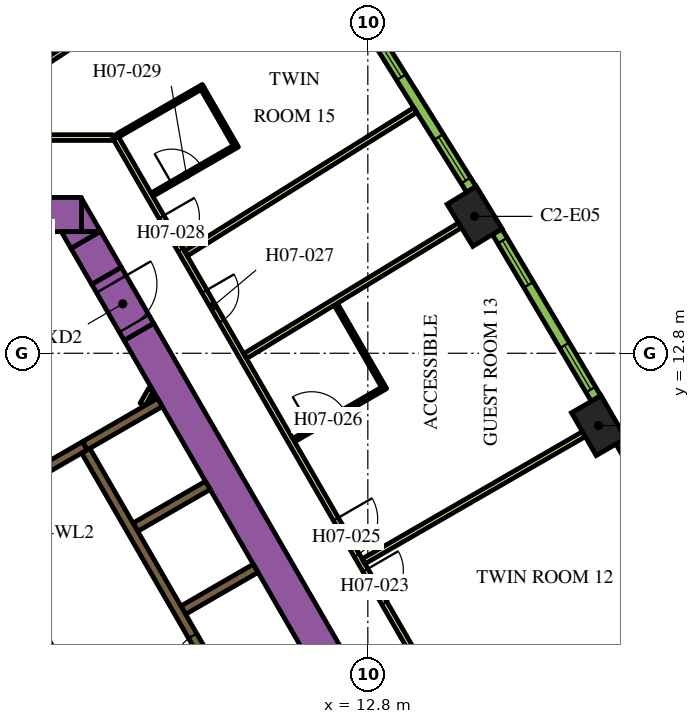
"""IFC4 building model, lengths in metres.
Left out: names, types, materials, properties, quantities, classifications, styles, units other than length and angle.
Written with IfcOpenShell. Run it as: python <this file> out.ifc"""

import sys

from ifc_helpers import new_model, si_unit, direction, frame, frame_2d, origin, origin_2d, place, context, subcontext, project, spatial, polyline, rectangle, outline, extrude, element, fill, save


model = new_model("IFC4")
c1 = context("Model", 3, precision=1e-05, world=origin(), true_north=direction((0.0, 1.0)))
c2 = subcontext(c1, "Body", "Model", "MODEL_VIEW")
j1 = project(units=[si_unit("LENGTHUNIT", "METRE"), si_unit("PLANEANGLEUNIT", "RADIAN")], contexts=[c1])
p1 = place(None, origin())
s1 = spatial("IfcSite", under=j1, at=p1, CompositionType="ELEMENT")
p2 = place(p1, origin())
s2 = spatial("IfcBuilding", under=s1, at=p2, CompositionType="ELEMENT")
p3 = place(p2, frame((0.0, 0.0, 95.4)))
s3 = spatial("IfcBuildingStorey", under=s2, at=p3, CompositionType="ELEMENT", Elevation=95.4)
for number, where, z_axis, x_axis in (
    (1, (18.874, 10.897, 0.0), (0.0, 0.0, 1.0), (-0.5, 0.866, 0.0)),
    (2, (15.609, 16.402, 0.0), (0.0, 0.0, 1.0), (-0.52, 0.854, 0.0)),
):
    element("IfcColumn", number, at=place(p3, frame(where, z_axis=z_axis, x_axis=x_axis)), inside=s3, PredefinedType="COLUMN", context=c2, shape_type="SweptSolid", body=[
        extrude(rectangle(XDim=1.3, YDim=0.9, at=origin_2d()), origin(), (0.0, 0.0, 1.0), 3.9),
    ])
p4 = place(p3, frame((6.776, 13.364, 0.0), z_axis=(0.0, 0.0, 1.0), x_axis=(0.500004177138, -0.8660229921, 0.0)))
e3 = element("IfcWall", 3, at=p4, inside=s3, PredefinedType="SOLIDWALL", context=c2, shape_type="SweptSolid", body=[
    extrude(rectangle(XDim=20.204, YDim=0.9, at=frame_2d((10.102, 0.0))), origin(), (0.0, 0.0, 1.0), 3.9),
])
p5 = place(p3, frame((-4.224, 16.45, 0.0), z_axis=(0.0, 0.0, 1.0), x_axis=(1.0, 0.0, 0.0)))
e4 = element("IfcWall", 4, at=p5, inside=s3, PredefinedType="SOLIDWALL", context=c2, shape_type="SweptSolid", body=[
    extrude(rectangle(XDim=9.488, YDim=0.9, at=frame_2d((4.744, 0.0))), origin(), (0.0, 0.0, 1.0), 3.9),
])
p6 = place(p3, origin())
e5 = element("IfcWall", 5, at=p6, inside=s3, PredefinedType="SOLIDWALL", context=c2, shape_type="SweptSolid", body=[
    extrude(outline(polyline([(5.265, 16.0), (5.265, 16.88), (5.773, 16.0), (5.265, 16.0)])), origin(), (0.0, 0.0, 1.0), 3.9),
])
p7 = place(p3, frame((5.926, 14.836, 0.0), z_axis=(0.0, 0.0, 1.0), x_axis=(-0.500076735116, 0.865981096212, 0.0)))
e6 = element("IfcWall", 6, at=p7, inside=s3, PredefinedType="SOLIDWALL", context=c2, shape_type="SweptSolid", body=[
    extrude(rectangle(XDim=1.094, YDim=0.9, at=frame_2d((0.547, 0.0))), origin(), (0.0, 0.0, 1.0), 3.9),
])
e7 = element("IfcWall", 7, at=p6, inside=s3, PredefinedType="SOLIDWALL", context=c2, shape_type="SweptSolid", body=[
    extrude(outline(polyline([(4.734, 16.0), (5.75, 16.0), (4.988, 15.56), (4.734, 16.0)])), origin(), (0.0, 0.0, 1.0), 3.9),
])
e8 = element("IfcWall", 8, at=p6, inside=s3, PredefinedType="SOLIDWALL", context=c2, shape_type="SweptSolid", body=[
    extrude(outline(polyline([(0.566, 6.725), (0.566, 6.875), (0.566, 6.875), (0.565, 6.875), (0.361, 6.875), (0.035, 7.439), (0.252, 7.564), (0.377, 7.348), (6.552, -3.348), (6.677, -3.564), (6.46, -3.689), (0.448, 6.725), (0.565, 6.725), (0.566, 6.725), (0.566, 6.725)])), origin(), (0.0, 0.0, 1.0), 3.9),
])
p8 = place(p3, frame((4.358, 9.791, 0.0), z_axis=(0.0, 0.0, 1.0), x_axis=(0.866079547155, 0.499906209203, 0.0)))
e9 = element("IfcWall", 9, at=p8, inside=s3, PredefinedType="SOLIDWALL", context=c2, shape_type="SweptSolid", body=[
    extrude(rectangle(XDim=1.15, YDim=0.25, at=frame_2d((0.575, 0.0))), origin(), (0.0, 0.0, 1.0), 3.9),
])
p9 = place(p3, frame((5.356, 10.367, 0.0), z_axis=(0.0, 0.0, 1.0), x_axis=(0.865978535641, 0.50008116922, 0.0)))
e10 = element("IfcWall", 10, at=p9, inside=s3, PredefinedType="SOLIDWALL", context=c2, shape_type="SweptSolid", body=[
    extrude(rectangle(XDim=2.278, YDim=0.25, at=frame_2d((1.139, 0.0))), origin(), (0.0, 0.0, 1.0), 3.9),
])
for number, where, z_axis, x_axis in (
    (11, (6.684, 8.224, 0.0), (0.0, 0.0, 1.0), (0.866, 0.5, 0.0)),
    (12, (7.944, 6.041, 0.0), (0.0, 0.0, 1.0), (0.866, 0.5, 0.0)),
):
    element("IfcWall", number, at=place(p3, frame(where, z_axis=z_axis, x_axis=x_axis)), inside=s3, PredefinedType="SOLIDWALL", context=c2, shape_type="SweptSolid", body=[
        extrude(rectangle(XDim=2.2, YDim=0.25, at=frame_2d((1.1, 0.0))), origin(), (0.0, 0.0, 1.0), 3.9),
    ])
p10 = place(p3, frame((6.872, 11.45, 0.0), z_axis=(0.0, 0.0, 1.0), x_axis=(0.499846793097, 0.866113839764, 0.0)))
e13 = element("IfcWall", 13, at=p10, inside=s3, PredefinedType="PARTITIONING", context=c2, shape_type="SweptSolid", body=[
    extrude(rectangle(XDim=0.453, YDim=0.15, at=frame_2d((0.227, 0.0))), origin(), (0.0, 0.0, 1.0), 2.75),
])
p11 = place(p3, frame((7.131, 11.6, 0.0), z_axis=(0.0, 0.0, 1.0), x_axis=(0.498600033135, 0.866832167699, 0.0)))
e14 = element("IfcWall", 14, at=p11, inside=s3, PredefinedType="PARTITIONING", context=c2, shape_type="SweptSolid", body=[
    extrude(rectangle(XDim=0.107, YDim=0.15, at=frame_2d((0.053, 0.0))), origin(), (0.0, 0.0, 1.0), 2.75),
])
p12 = place(p3, frame((11.553, -0.46, 0.0), z_axis=(0.0, 0.0, 1.0), x_axis=(-0.500006514828, 0.866021642414, 0.0)))
e15 = element("IfcWall", 15, at=p12, inside=s3, PredefinedType="SOLIDWALL", context=c2, shape_type="SweptSolid", body=[
    extrude(rectangle(XDim=12.35, YDim=0.25, at=frame_2d((6.175, 0.0))), origin(), (0.0, 0.0, 1.0), 3.9),
])
p13 = place(p12, frame((0.585, 0.0, 0.0)))
e16 = element("IfcOpeningElement", 16, at=p13, cuts=e15, PredefinedType="OPENING", context=c2, shape_type="SweptSolid", body=[
    extrude(rectangle(XDim=1.1, YDim=2.1, at=frame_2d((0.55, 1.05))), frame((0.0, 0.135, 0.0), z_axis=(0.0, -1.0, 0.0), x_axis=(1.0, 0.0, 0.0)), (0.0, 0.0, 1.0), 0.27),
])
p14 = place(p12, frame((3.105, 0.0, 0.0)))
e17 = element("IfcOpeningElement", 17, at=p14, cuts=e15, PredefinedType="OPENING", context=c2, shape_type="SweptSolid", body=[
    extrude(rectangle(XDim=1.1, YDim=2.1, at=frame_2d((0.55, 1.05))), frame((0.0, 0.135, 0.0), z_axis=(0.0, -1.0, 0.0), x_axis=(1.0, 0.0, 0.0)), (0.0, 0.0, 1.0), 0.27),
])
p15 = place(p12, frame((5.625, 0.0, 0.0)))
e18 = element("IfcOpeningElement", 18, at=p15, cuts=e15, PredefinedType="OPENING", context=c2, shape_type="SweptSolid", body=[
    extrude(rectangle(XDim=1.1, YDim=2.1, at=frame_2d((0.55, 1.05))), frame((0.0, 0.135, 0.0), z_axis=(0.0, -1.0, 0.0), x_axis=(1.0, 0.0, 0.0)), (0.0, 0.0, 1.0), 0.27),
])
p16 = place(p3, frame((8.565, -2.185, 0.0), z_axis=(0.0, 0.0, 1.0), x_axis=(-0.499997954832, 0.866026584559, 0.0)))
e19 = element("IfcWall", 19, at=p16, inside=s3, PredefinedType="SOLIDWALL", context=c2, shape_type="SweptSolid", body=[
    extrude(rectangle(XDim=12.35, YDim=0.25, at=frame_2d((6.175, 0.0))), origin(), (0.0, 0.0, 1.0), 3.9),
])
p17 = place(p16, frame((5.725, 0.0, 0.0)))
e20 = element("IfcOpeningElement", 20, at=p17, cuts=e19, PredefinedType="OPENING", context=c2, shape_type="SweptSolid", body=[
    extrude(rectangle(XDim=0.9, YDim=2.1, at=frame_2d((0.45, 1.05))), frame((0.0, 0.135, 0.0), z_axis=(0.0, -1.0, 0.0), x_axis=(1.0, 0.0, 0.0)), (0.0, 0.0, 1.0), 0.27),
])
p18 = place(p3, frame((5.926, 14.836, 0.0), z_axis=(0.0, 0.0, 1.0), x_axis=(0.500062241894, -0.865989465428, 0.0)))
e21 = element("IfcWall", 21, at=p18, inside=s3, PredefinedType="SOLIDWALL", context=c2, shape_type="SweptSolid", body=[
    extrude(rectangle(XDim=1.7, YDim=0.9, at=frame_2d((0.85, 0.0))), origin(), (0.0, 0.0, 1.0), 3.9),
])
p19 = place(p18, frame((0.25, 0.0, 0.0)))
e22 = element("IfcOpeningElement", 22, at=p19, cuts=e21, PredefinedType="OPENING", context=c2, shape_type="SweptSolid", body=[
    extrude(rectangle(XDim=1.2, YDim=2.1, at=frame_2d((0.6, 1.05))), frame((0.0, 0.46, 0.0), z_axis=(0.0, -1.0, 0.0), x_axis=(1.0, 0.0, 0.0)), (0.0, 0.0, 1.0), 0.92),
])
p20 = place(p3, frame((6.163, 18.475, 0.0), z_axis=(0.0, 0.0, 1.0), x_axis=(0.500001317485, -0.866024643133, 0.0)))
e23 = element("IfcWall", 23, at=p20, inside=s3, PredefinedType="PARTITIONING", context=c2, shape_type="SweptSolid", body=[
    extrude(rectangle(XDim=25.767, YDim=0.15, at=frame_2d((12.883, 0.0))), origin(), (0.0, 0.0, 1.0), 2.75),
])
p21 = place(p20, frame((24.241, 0.0, 0.0)))
e24 = element("IfcOpeningElement", 24, at=p21, cuts=e23, PredefinedType="OPENING", context=c2, shape_type="SweptSolid", body=[
    extrude(rectangle(XDim=1.0, YDim=2.1, at=frame_2d((0.5, 1.05))), frame((0.0, 0.085, 0.0), z_axis=(0.0, -1.0, 0.0), x_axis=(1.0, 0.0, 0.0)), (0.0, 0.0, 1.0), 0.17),
])
p22 = place(p20, frame((13.144, 0.0, 0.0)))
e25 = element("IfcOpeningElement", 25, at=p22, cuts=e23, PredefinedType="OPENING", context=c2, shape_type="SweptSolid", body=[
    extrude(rectangle(XDim=1.0, YDim=2.1, at=frame_2d((0.5, 1.05))), frame((0.0, 0.085, 0.0), z_axis=(0.0, -1.0, 0.0), x_axis=(1.0, 0.0, 0.0)), (0.0, 0.0, 1.0), 0.17),
])
p23 = place(p20, frame((11.592, 0.0, 0.0)))
e26 = element("IfcOpeningElement", 26, at=p23, cuts=e23, PredefinedType="OPENING", context=c2, shape_type="SweptSolid", body=[
    extrude(rectangle(XDim=1.1, YDim=2.1, at=frame_2d((0.55, 1.05))), frame((0.0, 0.085, 0.0), z_axis=(0.0, -1.0, 0.0), x_axis=(1.0, 0.0, 0.0)), (0.0, 0.0, 1.0), 0.17),
])
p24 = place(p20, frame((4.674, 0.0, 0.0)))
e27 = element("IfcOpeningElement", 27, at=p24, cuts=e23, PredefinedType="OPENING", context=c2, shape_type="SweptSolid", body=[
    extrude(rectangle(XDim=0.9, YDim=2.1, at=frame_2d((0.45, 1.05))), frame((0.0, 0.085, 0.0), z_axis=(0.0, -1.0, 0.0), x_axis=(1.0, 0.0, 0.0)), (0.0, 0.0, 1.0), 0.17),
])
p25 = place(p20, frame((2.411, 0.0, 0.0)))
e28 = element("IfcOpeningElement", 28, at=p25, cuts=e23, PredefinedType="OPENING", context=c2, shape_type="SweptSolid", body=[
    extrude(rectangle(XDim=1.0, YDim=2.1, at=frame_2d((0.5, 1.05))), frame((0.0, 0.085, 0.0), z_axis=(0.0, -1.0, 0.0), x_axis=(1.0, 0.0, 0.0)), (0.0, 0.0, 1.0), 0.17),
])
p26 = place(p3, frame((0.825, 18.475, 0.0), z_axis=(0.0, 0.0, 1.0), x_axis=(1.0, 0.0, 0.0)))
e29 = element("IfcWall", 29, at=p26, inside=s3, PredefinedType="PARTITIONING", context=c2, shape_type="SweptSolid", body=[
    extrude(rectangle(XDim=5.268, YDim=0.15, at=frame_2d((2.634, 0.0))), origin(), (0.0, 0.0, 1.0), 2.75),
])
p27 = place(p3, frame((10.592, 24.589, 0.0), z_axis=(0.0, 0.0, 1.0), x_axis=(-0.835337323748, -0.549737715236, 0.0)))
e30 = element("IfcWall", 30, at=p27, inside=s3, PredefinedType="PARTITIONING", context=c2, shape_type="SweptSolid", body=[
    extrude(rectangle(XDim=10.875, YDim=0.15, at=frame_2d((5.438, 0.0))), origin(), (0.0, 0.0, 1.0), 2.75),
])
p28 = place(p3, frame((14.049, 19.2, 0.0), z_axis=(0.0, 0.0, 1.0), x_axis=(-0.847955867271, -0.530066832731, 0.0)))
e31 = element("IfcWall", 31, at=p28, inside=s3, PredefinedType="PARTITIONING", context=c2, shape_type="SweptSolid", body=[
    extrude(rectangle(XDim=7.111, YDim=0.15, at=frame_2d((3.556, 0.0))), origin(), (0.0, 0.0, 1.0), 2.75),
])
p29 = place(p3, frame((15.225, 16.167, 0.0), z_axis=(0.0, 0.0, 1.0), x_axis=(-0.854088713274, -0.520127359266, 0.0)))
e32 = element("IfcWall", 32, at=p29, inside=s3, PredefinedType="PARTITIONING", context=c2, shape_type="SweptSolid", body=[
    extrude(rectangle(XDim=6.611, YDim=0.15, at=frame_2d((3.305, 0.0))), origin(), (0.0, 0.0, 1.0), 2.75),
])
p30 = place(p3, frame((18.484, 10.672, 0.0), z_axis=(0.0, 0.0, 1.0), x_axis=(-0.866019162053, -0.50001081084, 0.0)))
e33 = element("IfcWall", 33, at=p30, inside=s3, PredefinedType="PARTITIONING", context=c2, shape_type="SweptSolid", body=[
    extrude(rectangle(XDim=6.694, YDim=0.15, at=frame_2d((3.347, 0.0))), origin(), (0.0, 0.0, 1.0), 2.75),
])
p31 = place(p3, frame((21.614, 5.102, 0.0), z_axis=(0.0, 0.0, 1.0), x_axis=(-0.877484555087, -0.479604895287, 0.0)))
e34 = element("IfcWall", 34, at=p31, inside=s3, PredefinedType="PARTITIONING", context=c2, shape_type="SweptSolid", body=[
    extrude(rectangle(XDim=6.611, YDim=0.15, at=frame_2d((3.306, 0.0))), origin(), (0.0, 0.0, 1.0), 2.75),
])
p32 = place(p3, frame((10.847, 10.513, 0.0), z_axis=(0.0, 0.0, 1.0), x_axis=(0.865996816683, 0.500049511043, 0.0)))
e35 = element("IfcWall", 35, at=p32, inside=s3, PredefinedType="PARTITIONING", context=c2, shape_type="SweptSolid", body=[
    extrude(rectangle(XDim=2.8, YDim=0.1, at=frame_2d((1.4, 0.0))), origin(), (0.0, 0.0, 1.0), 2.75),
])
p33 = place(p32, frame((0.55, 0.0, 0.0)))
e36 = element("IfcOpeningElement", 36, at=p33, cuts=e35, PredefinedType="OPENING", context=c2, shape_type="SweptSolid", body=[
    extrude(rectangle(XDim=1.0, YDim=2.1, at=frame_2d((0.5, 1.05))), frame((0.0, 0.06, 0.0), z_axis=(0.0, -1.0, 0.0), x_axis=(1.0, 0.0, 0.0)), (0.0, 0.0, 1.0), 0.12),
])
p34 = place(p3, frame((13.203, 11.931, 0.0), z_axis=(0.0, 0.0, 1.0), x_axis=(-0.499988411372, 0.866032094379, 0.0)))
e37 = element("IfcWall", 37, at=p34, inside=s3, PredefinedType="PARTITIONING", context=c2, shape_type="SweptSolid", body=[
    extrude(rectangle(XDim=2.49, YDim=0.1, at=frame_2d((1.245, 0.0))), origin(), (0.0, 0.0, 1.0), 2.75),
])
p35 = place(p3, frame((7.118, 16.971, 0.0), z_axis=(0.0, 0.0, 1.0), x_axis=(0.866021400173, 0.500006934395, 0.0)))
e38 = element("IfcWall", 38, at=p35, inside=s3, PredefinedType="PARTITIONING", context=c2, shape_type="SweptSolid", body=[
    extrude(rectangle(XDim=2.6, YDim=0.1, at=frame_2d((1.3, 0.0))), origin(), (0.0, 0.0, 1.0), 2.75),
])
p36 = place(p35, frame((0.6, 0.0, 0.0)))
e39 = element("IfcOpeningElement", 39, at=p36, cuts=e38, PredefinedType="OPENING", context=c2, shape_type="SweptSolid", body=[
    extrude(rectangle(XDim=0.9, YDim=2.1, at=frame_2d((0.45, 1.05))), frame((0.0, 0.06, 0.0), z_axis=(0.0, -1.0, 0.0), x_axis=(1.0, 0.0, 0.0)), (0.0, 0.0, 1.0), 0.12),
])
p37 = place(p3, frame((9.302, 18.289, 0.0), z_axis=(0.0, 0.0, 1.0), x_axis=(-0.500062241894, 0.865989465428, 0.0)))
e40 = element("IfcWall", 40, at=p37, inside=s3, PredefinedType="PARTITIONING", context=c2, shape_type="SweptSolid", body=[
    extrude(rectangle(XDim=1.7, YDim=0.1, at=frame_2d((0.85, 0.0))), origin(), (0.0, 0.0, 1.0), 2.75),
])
p38 = place(p3, frame((6.218, 18.53, 0.0), z_axis=(0.0, 0.0, 1.0), x_axis=(0.865997922154, 0.500047596559, 0.0)))
e41 = element("IfcWall", 41, at=p38, inside=s3, PredefinedType="PARTITIONING", context=c2, shape_type="SweptSolid", body=[
    extrude(rectangle(XDim=2.6, YDim=0.1, at=frame_2d((1.3, 0.0))), origin(), (0.0, 0.0, 1.0), 2.75),
])
p39 = place(p3, frame((21.956, 6.033, 0.0), z_axis=(0.0, 0.0, 1.0), x_axis=(-0.48983164787, 0.87181704316, 0.0)))
e42 = element("IfcWall", 42, at=p39, inside=s3, PredefinedType="SOLIDWALL", context=c2, shape_type="SweptSolid", body=[
    extrude(rectangle(XDim=5.1, YDim=0.29, at=frame_2d((2.55, 0.0))), origin(), (0.0, 0.0, 1.0), 3.65),
])
p40 = place(p39, frame((0.273, 0.0, 0.9)))
e43 = element("IfcOpeningElement", 43, at=p40, cuts=e42, PredefinedType="OPENING", context=c2, shape_type="SweptSolid", body=[
    extrude(rectangle(XDim=1.35, YDim=2.15, at=frame_2d((0.675, 1.075))), frame((0.0, 0.155, 0.0), z_axis=(0.0, -1.0, 0.0), x_axis=(1.0, 0.0, 0.0)), (0.0, 0.0, 1.0), 0.31),
])
p41 = place(p39, frame((3.478, 0.0, 0.9)))
e44 = element("IfcOpeningElement", 44, at=p41, cuts=e42, PredefinedType="OPENING", context=c2, shape_type="SweptSolid", body=[
    extrude(rectangle(XDim=1.35, YDim=2.15, at=frame_2d((0.675, 1.075))), frame((0.0, 0.155, 0.0), z_axis=(0.0, -1.0, 0.0), x_axis=(1.0, 0.0, 0.0)), (0.0, 0.0, 1.0), 0.31),
])
p42 = place(p3, frame((18.805, 11.611, 0.0), z_axis=(0.0, 0.0, 1.0), x_axis=(-0.510054281659, 0.860142214847, 0.0)))
e45 = element("IfcWall", 45, at=p42, inside=s3, PredefinedType="SOLIDWALL", context=c2, shape_type="SweptSolid", body=[
    extrude(rectangle(XDim=5.101, YDim=0.29, at=frame_2d((2.55, 0.0))), origin(), (0.0, 0.0, 1.0), 3.65),
])
p43 = place(p42, frame((0.273, 0.0, 0.9)))
e46 = element("IfcOpeningElement", 46, at=p43, cuts=e45, PredefinedType="OPENING", context=c2, shape_type="SweptSolid", body=[
    extrude(rectangle(XDim=1.35, YDim=2.15, at=frame_2d((0.675, 1.075))), frame((0.0, 0.155, 0.0), z_axis=(0.0, -1.0, 0.0), x_axis=(1.0, 0.0, 0.0)), (0.0, 0.0, 1.0), 0.31),
])
p44 = place(p42, frame((3.478, 0.0, 0.9)))
e47 = element("IfcOpeningElement", 47, at=p44, cuts=e45, PredefinedType="OPENING", context=c2, shape_type="SweptSolid", body=[
    extrude(rectangle(XDim=1.35, YDim=2.15, at=frame_2d((0.675, 1.075))), frame((0.0, 0.155, 0.0), z_axis=(0.0, -1.0, 0.0), x_axis=(1.0, 0.0, 0.0)), (0.0, 0.0, 1.0), 0.31),
])
p45 = place(p3, frame((15.524, 17.114, 0.0), z_axis=(0.0, 0.0, 1.0), x_axis=(-0.530072082134, 0.847952585787, 0.0)))
e48 = element("IfcWall", 48, at=p45, inside=s3, PredefinedType="SOLIDWALL", context=c2, shape_type="SweptSolid", body=[
    extrude(rectangle(XDim=5.1, YDim=0.29, at=frame_2d((2.55, 0.0))), origin(), (0.0, 0.0, 1.0), 3.65),
])
p46 = place(p45, frame((0.273, 0.0, 0.9)))
e49 = element("IfcOpeningElement", 49, at=p46, cuts=e48, PredefinedType="OPENING", context=c2, shape_type="SweptSolid", body=[
    extrude(rectangle(XDim=1.35, YDim=2.15, at=frame_2d((0.675, 1.075))), frame((0.0, 0.155, 0.0), z_axis=(0.0, -1.0, 0.0), x_axis=(1.0, 0.0, 0.0)), (0.0, 0.0, 1.0), 0.31),
])
p47 = place(p45, frame((3.478, 0.0, 0.9)))
e50 = element("IfcOpeningElement", 50, at=p47, cuts=e48, PredefinedType="OPENING", context=c2, shape_type="SweptSolid", body=[
    extrude(rectangle(XDim=1.35, YDim=2.15, at=frame_2d((0.675, 1.075))), frame((0.0, 0.155, 0.0), z_axis=(0.0, -1.0, 0.0), x_axis=(1.0, 0.0, 0.0)), (0.0, 0.0, 1.0), 0.31),
])
p48 = place(p15, origin())
e51 = element("IfcDoor", 51, at=p48, inside=s3, OperationType="DOUBLE_DOOR_SLIDING", PredefinedType="DOOR", context=c2, shape_type="SweptSolid", body=[
    extrude(rectangle(XDim=1.1, YDim=2.1, at=frame_2d((0.55, 1.05))), frame((0.0, 0.025, 0.0), z_axis=(0.0, -1.0, 0.0), x_axis=(1.0, 0.0, 0.0)), (0.0, 0.0, 1.0), 0.05),
])
fill(e18, e51)
p49 = place(p19, origin())
e52 = element("IfcDoor", 52, at=p49, inside=s3, OperationType="SINGLE_SWING_LEFT", PredefinedType="DOOR", context=c2, shape_type="SweptSolid", body=[
    extrude(rectangle(XDim=1.2, YDim=2.1, at=frame_2d((0.6, 1.05))), frame((0.0, 0.025, 0.0), z_axis=(0.0, -1.0, 0.0), x_axis=(1.0, 0.0, 0.0)), (0.0, 0.0, 1.0), 0.05),
])
fill(e22, e52)
p50 = place(p22, origin())
e53 = element("IfcDoor", 53, at=p50, inside=s3, OperationType="SINGLE_SWING_LEFT", PredefinedType="DOOR", context=c2, shape_type="SweptSolid", body=[
    extrude(rectangle(XDim=1.0, YDim=2.1, at=frame_2d((0.5, 1.05))), frame((0.0, 0.025, 0.0), z_axis=(0.0, -1.0, 0.0), x_axis=(1.0, 0.0, 0.0)), (0.0, 0.0, 1.0), 0.05),
])
fill(e25, e53)
p51 = place(p23, origin())
e54 = element("IfcDoor", 54, at=p51, inside=s3, OperationType="SINGLE_SWING_RIGHT", PredefinedType="DOOR", context=c2, shape_type="SweptSolid", body=[
    extrude(rectangle(XDim=1.1, YDim=2.1, at=frame_2d((0.55, 1.05))), frame((0.0, 0.025, 0.0), z_axis=(0.0, -1.0, 0.0), x_axis=(1.0, 0.0, 0.0)), (0.0, 0.0, 1.0), 0.05),
])
fill(e26, e54)
p52 = place(p33, origin())
e55 = element("IfcDoor", 55, at=p52, inside=s3, OperationType="SINGLE_SWING_LEFT", PredefinedType="DOOR", context=c2, shape_type="SweptSolid", body=[
    extrude(rectangle(XDim=1.0, YDim=2.1, at=frame_2d((0.5, 1.05))), frame((0.0, 0.025, 0.0), z_axis=(0.0, -1.0, 0.0), x_axis=(1.0, 0.0, 0.0)), (0.0, 0.0, 1.0), 0.05),
])
fill(e36, e55)
p53 = place(p24, origin())
e56 = element("IfcDoor", 56, at=p53, inside=s3, OperationType="SINGLE_SWING_RIGHT", PredefinedType="DOOR", context=c2, shape_type="SweptSolid", body=[
    extrude(rectangle(XDim=0.9, YDim=2.1, at=frame_2d((0.45, 1.05))), frame((0.0, 0.025, 0.0), z_axis=(0.0, -1.0, 0.0), x_axis=(1.0, 0.0, 0.0)), (0.0, 0.0, 1.0), 0.05),
])
fill(e27, e56)
p54 = place(p25, origin())
e57 = element("IfcDoor", 57, at=p54, inside=s3, OperationType="SINGLE_SWING_RIGHT", PredefinedType="DOOR", context=c2, shape_type="SweptSolid", body=[
    extrude(rectangle(XDim=1.0, YDim=2.1, at=frame_2d((0.5, 1.05))), frame((0.0, 0.025, 0.0), z_axis=(0.0, -1.0, 0.0), x_axis=(1.0, 0.0, 0.0)), (0.0, 0.0, 1.0), 0.05),
])
fill(e28, e57)
p55 = place(p36, origin())
e58 = element("IfcDoor", 58, at=p55, inside=s3, OperationType="SINGLE_SWING_RIGHT", PredefinedType="DOOR", context=c2, shape_type="SweptSolid", body=[
    extrude(rectangle(XDim=0.9, YDim=2.1, at=frame_2d((0.45, 1.05))), frame((0.0, 0.025, 0.0), z_axis=(0.0, -1.0, 0.0), x_axis=(1.0, 0.0, 0.0)), (0.0, 0.0, 1.0), 0.05),
])
fill(e39, e58)
p56 = place(p43, origin())
e59 = element("IfcWindow", 59, at=p56, inside=s3, PartitioningType="DOUBLE_PANEL_VERTICAL", PredefinedType="WINDOW", context=c2, shape_type="SweptSolid", body=[
    extrude(rectangle(XDim=1.35, YDim=2.15, at=frame_2d((0.675, 1.075))), frame((0.0, 0.015, 0.0), z_axis=(0.0, -1.0, 0.0), x_axis=(1.0, 0.0, 0.0)), (0.0, 0.0, 1.0), 0.06),
])
fill(e46, e59)
p57 = place(p44, origin())
e60 = element("IfcWindow", 60, at=p57, inside=s3, PartitioningType="DOUBLE_PANEL_VERTICAL", PredefinedType="WINDOW", context=c2, shape_type="SweptSolid", body=[
    extrude(rectangle(XDim=1.35, YDim=2.15, at=frame_2d((0.675, 1.075))), frame((0.0, 0.015, 0.0), z_axis=(0.0, -1.0, 0.0), x_axis=(1.0, 0.0, 0.0)), (0.0, 0.0, 1.0), 0.06),
])
fill(e47, e60)
p58 = place(p46, origin())
e61 = element("IfcWindow", 61, at=p58, inside=s3, PartitioningType="DOUBLE_PANEL_VERTICAL", PredefinedType="WINDOW", context=c2, shape_type="SweptSolid", body=[
    extrude(rectangle(XDim=1.35, YDim=2.15, at=frame_2d((0.675, 1.075))), frame((0.0, 0.015, 0.0), z_axis=(0.0, -1.0, 0.0), x_axis=(1.0, 0.0, 0.0)), (0.0, 0.0, 1.0), 0.06),
])
fill(e49, e61)
p59 = place(p47, origin())
e62 = element("IfcWindow", 62, at=p59, inside=s3, PartitioningType="DOUBLE_PANEL_VERTICAL", PredefinedType="WINDOW", context=c2, shape_type="SweptSolid", body=[
    extrude(rectangle(XDim=1.35, YDim=2.15, at=frame_2d((0.675, 1.075))), frame((0.0, 0.015, 0.0), z_axis=(0.0, -1.0, 0.0), x_axis=(1.0, 0.0, 0.0)), (0.0, 0.0, 1.0), 0.06),
])
fill(e50, e62)
save(model, sys.argv[1])
